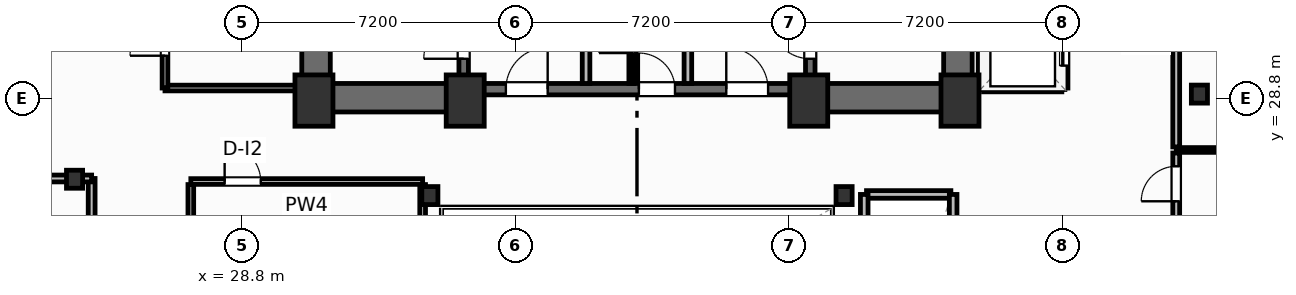
"""IFC4 building model, lengths in metres.
Left out: names, types, materials, properties, quantities, classifications, styles, units other than length and angle.
Written with IfcOpenShell. Run it as: python <this file> out.ifc"""

import sys

from ifc_helpers import new_model, si_unit, direction, frame, frame_2d, origin, origin_2d, place, context, subcontext, project, spatial, rectangle, i_section, extrude, element, fill, save


model = new_model("IFC4")
c1 = context("Model", 3, precision=1e-05, world=origin(), true_north=direction((0.0, 1.0)))
c2 = subcontext(c1, "Body", "Model", "MODEL_VIEW")
j1 = project(units=[si_unit("LENGTHUNIT", "METRE"), si_unit("PLANEANGLEUNIT", "RADIAN")], contexts=[c1])
p1 = place(None, origin())
s1 = spatial("IfcSite", under=j1, at=p1, CompositionType="ELEMENT")
p2 = place(p1, origin())
s2 = spatial("IfcBuilding", under=s1, at=p2, CompositionType="ELEMENT")
p3 = place(p2, frame((0.0, 0.0, 129.1)))
s3 = spatial("IfcBuildingStorey", under=s2, at=p3, CompositionType="ELEMENT", Elevation=129.1)
for number, where, z_axis, x_axis in (
    (1, (30.7, 28.75, 0.0), (0.0, 0.0, 1.0), (1.0, 0.0, 0.0)),
    (2, (34.68, 28.75, 0.0), (0.0, 0.0, 1.0), (1.0, 0.0, 0.0)),
    (3, (43.72, 28.75, 0.0), (0.0, 0.0, 1.0), (1.0, 0.0, 0.0)),
    (4, (47.7, 28.75, 0.0), (0.0, 0.0, 1.0), (1.0, 0.0, 0.0)),
):
    element("IfcColumn", number, at=place(p3, frame(where, z_axis=z_axis, x_axis=x_axis)), inside=s3, PredefinedType="COLUMN", context=c2, shape_type="SweptSolid", body=[
        extrude(rectangle(XDim=1.0, YDim=1.35, at=origin_2d()), origin(), (0.0, 0.0, 1.0), 3.7),
    ])
for number, where, z_axis, x_axis in (
    (5, (33.75, 26.25, 0.0), (0.0, 0.0, 1.0), (1.0, 0.0, 0.0)),
    (6, (44.65, 26.25, 0.0), (0.0, 0.0, 1.0), (1.0, 0.0, 0.0)),
    (7, (24.4, 26.68, 0.0), (0.0, 0.0, 1.0), (1.0, 0.0, 0.0)),
    (8, (54.0, 28.92, 0.0), (0.0, 0.0, 1.0), (1.0, 0.0, 0.0)),
):
    element("IfcColumn", number, at=place(p3, frame(where, z_axis=z_axis, x_axis=x_axis)), inside=s3, PredefinedType="COLUMN", context=c2, shape_type="SweptSolid", body=[
        extrude(i_section(OverallWidth=0.424, OverallDepth=0.474, WebThickness=0.048, FlangeThickness=0.077, FilletRadius=0.025, at=origin_2d()), origin(), (0.0, 0.0, 1.0), 3.7),
    ])
for number, where, z_axis, x_axis in (
    (9, (30.755, 29.2, 0.0), (0.0, 0.0, 1.0), (0.0, 1.0, 0.0)),
    (10, (47.645, 29.2, 0.0), (0.0, 0.0, 1.0), (0.0, 1.0, 0.0)),
):
    element("IfcWall", number, at=place(p3, frame(where, z_axis=z_axis, x_axis=x_axis)), inside=s3, PredefinedType="SHEAR", context=c2, shape_type="SweptSolid", body=[
        extrude(rectangle(XDim=9.22, YDim=0.75, at=frame_2d((4.61, 0.0))), origin(), (0.0, 0.0, 1.0), 3.45),
    ])
p4 = place(p3, frame((30.38, 28.825, 0.0), z_axis=(0.0, 0.0, 1.0), x_axis=(1.0, 0.0, 0.0)))
e11 = element("IfcWall", 11, at=p4, inside=s3, PredefinedType="SHEAR", context=c2, shape_type="SweptSolid", body=[
    extrude(rectangle(XDim=4.42, YDim=0.75, at=frame_2d((2.21, 0.0))), origin(), (0.0, 0.0, 1.0), 3.45),
])
p5 = place(p3, frame((43.6, 28.825, 0.0), z_axis=(0.0, 0.0, 1.0), x_axis=(1.0, 0.0, 0.0)))
e12 = element("IfcWall", 12, at=p5, inside=s3, PredefinedType="SHEAR", context=c2, shape_type="SweptSolid", body=[
    extrude(rectangle(XDim=4.42, YDim=0.75, at=frame_2d((2.21, 0.0))), origin(), (0.0, 0.0, 1.0), 3.45),
])
p6 = place(p3, frame((34.8, 29.05, 0.0), z_axis=(0.0, 0.0, 1.0), x_axis=(1.0, 0.0, 0.0)))
e13 = element("IfcWall", 13, at=p6, inside=s3, PredefinedType="SHEAR", context=c2, shape_type="SweptSolid", body=[
    extrude(rectangle(XDim=8.8, YDim=0.3, at=frame_2d((4.4, 0.0))), origin(), (0.0, 0.0, 1.0), 3.45),
])
p7 = place(p6, frame((0.95, 0.0, 0.0)))
e14 = element("IfcOpeningElement", 14, at=p7, cuts=e13, PredefinedType="OPENING", context=c2, shape_type="SweptSolid", body=[
    extrude(rectangle(XDim=1.1, YDim=2.15, at=frame_2d((0.55, 1.075))), frame((0.0, 0.16, 0.0), z_axis=(0.0, -1.0, 0.0), x_axis=(1.0, 0.0, 0.0)), (0.0, 0.0, 1.0), 0.32),
])
p8 = place(p6, frame((6.75, 0.0, 0.0)))
e15 = element("IfcOpeningElement", 15, at=p8, cuts=e13, PredefinedType="OPENING", context=c2, shape_type="SweptSolid", body=[
    extrude(rectangle(XDim=1.1, YDim=2.15, at=frame_2d((0.55, 1.075))), frame((0.0, 0.16, 0.0), z_axis=(0.0, -1.0, 0.0), x_axis=(1.0, 0.0, 0.0)), (0.0, 0.0, 1.0), 0.32),
])
p9 = place(p6, frame((4.45, 0.0, 0.0)))
e16 = element("IfcOpeningElement", 16, at=p9, cuts=e13, PredefinedType="OPENING", context=c2, shape_type="SweptSolid", body=[
    extrude(rectangle(XDim=0.95, YDim=2.15, at=frame_2d((0.475, 1.075))), frame((0.0, 0.16, 0.0), z_axis=(0.0, -1.0, 0.0), x_axis=(1.0, 0.0, 0.0)), (0.0, 0.0, 1.0), 0.32),
])
p10 = place(p3, frame((34.64, 29.2, 0.0), z_axis=(0.0, 0.0, 1.0), x_axis=(0.0, 1.0, 0.0)))
e17 = element("IfcWall", 17, at=p10, inside=s3, PredefinedType="SHEAR", context=c2, shape_type="SweptSolid", body=[
    extrude(rectangle(XDim=9.22, YDim=0.25, at=frame_2d((4.61, 0.0))), origin(), (0.0, 0.0, 1.0), 3.45),
])
p11 = place(p10, frame((0.65, 0.0, 0.0)))
e18 = element("IfcOpeningElement", 18, at=p11, cuts=e17, PredefinedType="OPENING", context=c2, shape_type="SweptSolid", body=[
    extrude(rectangle(XDim=1.05, YDim=2.15, at=frame_2d((0.525, 1.075))), frame((0.0, 0.135, 0.0), z_axis=(0.0, -1.0, 0.0), x_axis=(1.0, 0.0, 0.0)), (0.0, 0.0, 1.0), 0.27),
])
p12 = place(p3, frame((43.76, 29.2, 0.0), z_axis=(0.0, 0.0, 1.0), x_axis=(0.0, 1.0, 0.0)))
e19 = element("IfcWall", 19, at=p12, inside=s3, PredefinedType="SHEAR", context=c2, shape_type="SweptSolid", body=[
    extrude(rectangle(XDim=9.22, YDim=0.25, at=frame_2d((4.61, 0.0))), origin(), (0.0, 0.0, 1.0), 3.45),
])
p13 = place(p12, frame((0.65, 0.0, 0.0)))
e20 = element("IfcOpeningElement", 20, at=p13, cuts=e19, PredefinedType="OPENING", context=c2, shape_type="SweptSolid", body=[
    extrude(rectangle(XDim=1.05, YDim=2.15, at=frame_2d((0.525, 1.075))), frame((0.0, 0.135, 0.0), z_axis=(0.0, -1.0, 0.0), x_axis=(1.0, 0.0, 0.0)), (0.0, 0.0, 1.0), 0.27),
])
p14 = place(p3, frame((24.85, 19.2, 0.0), z_axis=(0.0, 0.0, 1.0), x_axis=(0.0, 1.0, 0.0)))
e21 = element("IfcWall", 21, at=p14, inside=s3, PredefinedType="PARTITIONING", context=c2, shape_type="SweptSolid", body=[
    extrude(rectangle(XDim=7.5, YDim=0.18, at=frame_2d((3.75, 0.0))), origin(), (0.0, 0.0, 1.0), 3.45),
])
p15 = place(p14, frame((3.275, 0.0, 0.0)))
e22 = element("IfcOpeningElement", 22, at=p15, cuts=e21, PredefinedType="OPENING", context=c2, shape_type="SweptSolid", body=[
    extrude(rectangle(XDim=0.95, YDim=2.05, at=frame_2d((0.475, 1.025))), frame((0.0, 0.1, 0.0), z_axis=(0.0, -1.0, 0.0), x_axis=(1.0, 0.0, 0.0)), (0.0, 0.0, 1.0), 0.2),
])
p16 = place(p3, frame((2.078, 26.7, 0.0), z_axis=(0.0, 0.0, 1.0), x_axis=(1.0, 0.0, 0.0)))
e23 = element("IfcWall", 23, at=p16, inside=s3, PredefinedType="PARTITIONING", context=c2, shape_type="SweptSolid", body=[
    extrude(rectangle(XDim=22.772, YDim=0.18, at=frame_2d((11.386, 0.0))), origin(), (0.0, 0.0, 1.0), 2.662),
])
p17 = place(p3, frame((53.39, 19.3, 0.0), z_axis=(0.0, 0.0, 1.0), x_axis=(0.0, 1.0, 0.0)))
e24 = element("IfcWall", 24, at=p17, inside=s3, PredefinedType="PARTITIONING", context=c2, shape_type="SweptSolid", body=[
    extrude(rectangle(XDim=8.07, YDim=0.18, at=frame_2d((4.035, 0.0))), origin(), (0.0, 0.0, 1.0), 3.45),
])
p18 = place(p17, frame((6.8, 0.0, 0.0)))
e25 = element("IfcOpeningElement", 25, at=p18, cuts=e24, PredefinedType="OPENING", context=c2, shape_type="SweptSolid", body=[
    extrude(rectangle(XDim=0.92, YDim=2.05, at=frame_2d((0.46, 1.025))), frame((0.0, 0.1, 0.0), z_axis=(0.0, -1.0, 0.0), x_axis=(1.0, 0.0, 0.0)), (0.0, 0.0, 1.0), 0.2),
])
p19 = place(p3, frame((53.39, 27.53, 0.0), z_axis=(0.0, 0.0, 1.0), x_axis=(0.0, 1.0, 0.0)))
e26 = element("IfcWall", 26, at=p19, inside=s3, PredefinedType="PARTITIONING", context=c2, shape_type="SweptSolid", body=[
    extrude(rectangle(XDim=11.67, YDim=0.18, at=frame_2d((5.835, 0.0))), origin(), (0.0, 0.0, 1.0), 3.45),
])
p20 = place(p19, frame((5.8, 0.0, 0.0)))
e27 = element("IfcOpeningElement", 27, at=p20, cuts=e26, PredefinedType="OPENING", context=c2, shape_type="SweptSolid", body=[
    extrude(rectangle(XDim=0.92, YDim=2.05, at=frame_2d((0.46, 1.025))), frame((0.0, 0.1, 0.0), z_axis=(0.0, -1.0, 0.0), x_axis=(1.0, 0.0, 0.0)), (0.0, 0.0, 1.0), 0.2),
])
p21 = place(p3, frame((53.39, 27.45, 0.0), z_axis=(0.0, 0.0, 1.0), x_axis=(1.0, 0.0, 0.0)))
e28 = element("IfcWall", 28, at=p21, inside=s3, PredefinedType="PARTITIONING", context=c2, shape_type="SweptSolid", body=[
    extrude(rectangle(XDim=23.362, YDim=0.125, at=frame_2d((11.681, 0.0))), origin(), (0.0, 0.0, 1.0), 3.45),
])
for number, where, z_axis, x_axis in (
    (29, (37.86, 29.2, 0.0), (0.0, 0.0, 1.0), (0.0, 1.0, 0.0)),
    (30, (40.54, 29.2, 0.0), (0.0, 0.0, 1.0), (0.0, 1.0, 0.0)),
):
    element("IfcWall", number, at=place(p3, frame(where, z_axis=z_axis, x_axis=x_axis)), inside=s3, PredefinedType="PARTITIONING", context=c2, shape_type="SweptSolid", body=[
        extrude(rectangle(XDim=5.18, YDim=0.2, at=frame_2d((2.59, 0.0))), origin(), (0.0, 0.0, 1.0), 3.45),
    ])
p22 = place(p3, frame((39.05, 29.2, 0.0), z_axis=(0.0, 0.0, 1.0), x_axis=(0.0, 1.0, 0.0)))
e31 = element("IfcWall", 31, at=p22, inside=s3, PredefinedType="PARTITIONING", context=c2, shape_type="SweptSolid", body=[
    extrude(rectangle(XDim=5.22, YDim=0.125, at=frame_2d((2.61, 0.0))), origin(), (0.0, 0.0, 1.0), 3.45),
])
p23 = place(p22, frame((0.8, 0.0, 0.0)))
e32 = element("IfcOpeningElement", 32, at=p23, cuts=e31, PredefinedType="OPENING", context=c2, shape_type="SweptSolid", body=[
    extrude(rectangle(XDim=0.85, YDim=2.05, at=frame_2d((0.425, 1.025))), frame((0.0, 0.073, 0.0), z_axis=(0.0, -1.0, 0.0), x_axis=(1.0, 0.0, 0.0)), (0.0, 0.0, 1.0), 0.145),
])
p24 = place(p22, frame((3.4, 0.0, 0.0)))
e33 = element("IfcOpeningElement", 33, at=p24, cuts=e31, PredefinedType="OPENING", context=c2, shape_type="SweptSolid", body=[
    extrude(rectangle(XDim=0.85, YDim=2.05, at=frame_2d((0.425, 1.025))), frame((0.0, 0.073, 0.0), z_axis=(0.0, -1.0, 0.0), x_axis=(1.0, 0.0, 0.0)), (0.0, 0.0, 1.0), 0.145),
])
p25 = place(p3, frame((27.46, 26.62, 0.0), z_axis=(0.0, 0.0, 1.0), x_axis=(1.0, 0.0, 0.0)))
e34 = element("IfcWall", 34, at=p25, inside=s3, PredefinedType="PARTITIONING", context=c2, shape_type="SweptSolid", body=[
    extrude(rectangle(XDim=6.1, YDim=0.15, at=frame_2d((3.05, 0.0))), origin(), (0.0, 0.0, 1.0), 2.662),
])
p26 = place(p25, frame((0.89, 0.0, 0.0)))
e35 = element("IfcOpeningElement", 35, at=p26, cuts=e34, PredefinedType="OPENING", context=c2, shape_type="SweptSolid", body=[
    extrude(rectangle(XDim=0.95, YDim=2.05, at=frame_2d((0.475, 1.025))), frame((0.0, 0.085, 0.0), z_axis=(0.0, -1.0, 0.0), x_axis=(1.0, 0.0, 0.0)), (0.0, 0.0, 1.0), 0.17),
])
p27 = place(p3, frame((27.46, 19.38, 0.0), z_axis=(0.0, 0.0, 1.0), x_axis=(0.0, 1.0, 0.0)))
e36 = element("IfcWall", 36, at=p27, inside=s3, PredefinedType="PARTITIONING", context=c2, shape_type="SweptSolid", body=[
    extrude(rectangle(XDim=7.16, YDim=0.15, at=frame_2d((3.58, 0.0))), origin(), (0.0, 0.0, 1.0), 3.45),
])
p28 = place(p27, frame((1.1, 0.0, 0.0)))
e37 = element("IfcOpeningElement", 37, at=p28, cuts=e36, PredefinedType="OPENING", context=c2, shape_type="SweptSolid", body=[
    extrude(rectangle(XDim=0.9, YDim=2.05, at=frame_2d((0.45, 1.025))), frame((0.0, 0.085, 0.0), z_axis=(0.0, -1.0, 0.0), x_axis=(1.0, 0.0, 0.0)), (0.0, 0.0, 1.0), 0.17),
])
p29 = place(p3, frame((33.56, 19.38, 0.0), z_axis=(0.0, 0.0, 1.0), x_axis=(0.0, 1.0, 0.0)))
e38 = element("IfcWall", 38, at=p29, inside=s3, PredefinedType="PARTITIONING", context=c2, shape_type="SweptSolid", body=[
    extrude(rectangle(XDim=7.16, YDim=0.15, at=frame_2d((3.58, 0.0))), origin(), (0.0, 0.0, 1.0), 2.824),
])
p30 = place(p3, frame((26.78, 29.08, 0.0), z_axis=(0.0, 0.0, 1.0), x_axis=(1.0, 0.0, 0.0)))
e39 = element("IfcWall", 39, at=p30, inside=s3, PredefinedType="PARTITIONING", context=c2, shape_type="SweptSolid", body=[
    extrude(rectangle(XDim=3.6, YDim=0.15, at=frame_2d((1.8, 0.0))), origin(), (0.0, 0.0, 1.0), 3.45),
])
p31 = place(p3, frame((26.78, 29.08, 0.0), z_axis=(0.0, 0.0, 1.0), x_axis=(0.0, 1.0, 0.0)))
e40 = element("IfcWall", 40, at=p31, inside=s3, PredefinedType="PARTITIONING", context=c2, shape_type="SweptSolid", body=[
    extrude(rectangle(XDim=5.87, YDim=0.15, at=frame_2d((2.935, 0.0))), origin(), (0.0, 0.0, 1.0), 3.45),
])
p32 = place(p31, frame((0.85, 0.0, 0.0)))
e41 = element("IfcOpeningElement", 41, at=p32, cuts=e40, PredefinedType="OPENING", context=c2, shape_type="SweptSolid", body=[
    extrude(rectangle(XDim=0.92, YDim=2.05, at=frame_2d((0.46, 1.025))), frame((0.0, 0.085, 0.0), z_axis=(0.0, -1.0, 0.0), x_axis=(1.0, 0.0, 0.0)), (0.0, 0.0, 1.0), 0.17),
])
p33 = place(p31, frame((3.45, 0.0, 0.0)))
e42 = element("IfcOpeningElement", 42, at=p33, cuts=e40, PredefinedType="OPENING", context=c2, shape_type="SweptSolid", body=[
    extrude(rectangle(XDim=0.85, YDim=2.05, at=frame_2d((0.425, 1.025))), frame((0.0, 0.085, 0.0), z_axis=(0.0, -1.0, 0.0), x_axis=(1.0, 0.0, 0.0)), (0.0, 0.0, 1.0), 0.17),
])
p34 = place(p3, frame((48.32, 29.08, 0.0), z_axis=(0.0, 0.0, 1.0), x_axis=(1.0, 0.0, 0.0)))
e43 = element("IfcWall", 43, at=p34, inside=s3, PredefinedType="PARTITIONING", context=c2, shape_type="SweptSolid", body=[
    extrude(rectangle(XDim=2.06, YDim=0.2, at=frame_2d((1.03, 0.0))), origin(), (0.0, 0.0, 1.0), 2.662),
])
p35 = place(p3, frame((48.28, 29.08, 0.0), z_axis=(0.0, 0.0, 1.0), x_axis=(0.0, 1.0, 0.0)))
e44 = element("IfcWall", 44, at=p35, inside=s3, PredefinedType="PARTITIONING", context=c2, shape_type="SweptSolid", body=[
    extrude(rectangle(XDim=6.89, YDim=0.2, at=frame_2d((3.445, 0.0))), origin(), (0.0, 0.0, 1.0), 3.45),
])
p36 = place(p3, frame((50.44, 29.08, 0.0), z_axis=(0.0, 0.0, 1.0), x_axis=(0.0, 1.0, 0.0)))
e45 = element("IfcWall", 45, at=p36, inside=s3, PredefinedType="PARTITIONING", context=c2, shape_type="SweptSolid", body=[
    extrude(rectangle(XDim=6.89, YDim=0.2, at=frame_2d((3.445, 0.0))), origin(), (0.0, 0.0, 1.0), 3.45),
])
p37 = place(p36, frame((0.59, 0.0, 0.0)))
e46 = element("IfcOpeningElement", 46, at=p37, cuts=e45, PredefinedType="OPENING", context=c2, shape_type="SweptSolid", body=[
    extrude(rectangle(XDim=1.1, YDim=2.15, at=frame_2d((0.55, 1.075))), frame((0.0, 0.11, 0.0), z_axis=(0.0, -1.0, 0.0), x_axis=(1.0, 0.0, 0.0)), (0.0, 0.0, 1.0), 0.22),
])
p38 = place(p36, frame((2.89, 0.0, 0.0)))
e47 = element("IfcOpeningElement", 47, at=p38, cuts=e45, PredefinedType="OPENING", context=c2, shape_type="SweptSolid", body=[
    extrude(rectangle(XDim=1.1, YDim=2.15, at=frame_2d((0.55, 1.075))), frame((0.0, 0.11, 0.0), z_axis=(0.0, -1.0, 0.0), x_axis=(1.0, 0.0, 0.0)), (0.0, 0.0, 1.0), 0.22),
])
p39 = place(p36, frame((5.19, 0.0, 0.0)))
e48 = element("IfcOpeningElement", 48, at=p39, cuts=e45, PredefinedType="OPENING", context=c2, shape_type="SweptSolid", body=[
    extrude(rectangle(XDim=1.1, YDim=2.15, at=frame_2d((0.55, 1.075))), frame((0.0, 0.11, 0.0), z_axis=(0.0, -1.0, 0.0), x_axis=(1.0, 0.0, 0.0)), (0.0, 0.0, 1.0), 0.22),
])
p40 = place(p3, frame((45.24, 26.28, 0.0), z_axis=(0.0, 0.0, 1.0), x_axis=(1.0, 0.0, 0.0)))
e49 = element("IfcWall", 49, at=p40, inside=s3, PredefinedType="PARTITIONING", context=c2, shape_type="SweptSolid", body=[
    extrude(rectangle(XDim=2.22, YDim=0.2, at=frame_2d((1.11, 0.0))), origin(), (0.0, 0.0, 1.0), 3.45),
])
for number, where, z_axis, x_axis in (
    (50, (45.18, 19.38, 0.0), (0.0, 0.0, 1.0), (0.0, 1.0, 0.0)),
    (51, (47.52, 19.38, 0.0), (0.0, 0.0, 1.0), (0.0, 1.0, 0.0)),
):
    element("IfcWall", number, at=place(p3, frame(where, z_axis=z_axis, x_axis=x_axis)), inside=s3, PredefinedType="PARTITIONING", context=c2, shape_type="SweptSolid", body=[
        extrude(rectangle(XDim=6.9, YDim=0.2, at=frame_2d((3.45, 0.0))), origin(), (0.0, 0.0, 1.0), 3.45),
    ])
p41 = place(p18, origin())
e52 = element("IfcDoor", 52, at=p41, inside=s3, OperationType="SINGLE_SWING_LEFT", PredefinedType="DOOR", context=c2, shape_type="SweptSolid", body=[
    extrude(rectangle(XDim=0.92, YDim=2.05, at=frame_2d((0.46, 1.025))), frame((0.0, 0.025, 0.0), z_axis=(0.0, -1.0, 0.0), x_axis=(1.0, 0.0, 0.0)), (0.0, 0.0, 1.0), 0.05),
])
fill(e25, e52)
p42 = place(p11, origin())
e53 = element("IfcDoor", 53, at=p42, inside=s3, OperationType="SINGLE_SWING_LEFT", PredefinedType="DOOR", context=c2, shape_type="SweptSolid", body=[
    extrude(rectangle(XDim=1.05, YDim=2.15, at=frame_2d((0.525, 1.075))), frame((0.0, 0.025, 0.0), z_axis=(0.0, -1.0, 0.0), x_axis=(1.0, 0.0, 0.0)), (0.0, 0.0, 1.0), 0.05),
])
fill(e18, e53)
p43 = place(p13, origin())
e54 = element("IfcDoor", 54, at=p43, inside=s3, OperationType="SINGLE_SWING_RIGHT", PredefinedType="DOOR", context=c2, shape_type="SweptSolid", body=[
    extrude(rectangle(XDim=1.05, YDim=2.15, at=frame_2d((0.525, 1.075))), frame((0.0, 0.025, 0.0), z_axis=(0.0, -1.0, 0.0), x_axis=(1.0, 0.0, 0.0)), (0.0, 0.0, 1.0), 0.05),
])
fill(e20, e54)
p44 = place(p7, origin())
e55 = element("IfcDoor", 55, at=p44, inside=s3, OperationType="SINGLE_SWING_RIGHT", PredefinedType="DOOR", context=c2, shape_type="SweptSolid", body=[
    extrude(rectangle(XDim=1.1, YDim=2.15, at=frame_2d((0.55, 1.075))), frame((0.0, 0.025, 0.0), z_axis=(0.0, -1.0, 0.0), x_axis=(1.0, 0.0, 0.0)), (0.0, 0.0, 1.0), 0.05),
])
fill(e14, e55)
p45 = place(p8, origin())
e56 = element("IfcDoor", 56, at=p45, inside=s3, OperationType="SINGLE_SWING_LEFT", PredefinedType="DOOR", context=c2, shape_type="SweptSolid", body=[
    extrude(rectangle(XDim=1.1, YDim=2.15, at=frame_2d((0.55, 1.075))), frame((0.0, 0.025, 0.0), z_axis=(0.0, -1.0, 0.0), x_axis=(1.0, 0.0, 0.0)), (0.0, 0.0, 1.0), 0.05),
])
fill(e15, e56)
p46 = place(p23, origin())
e57 = element("IfcDoor", 57, at=p46, inside=s3, OperationType="SINGLE_SWING_LEFT", PredefinedType="DOOR", context=c2, shape_type="SweptSolid", body=[
    extrude(rectangle(XDim=0.85, YDim=2.05, at=frame_2d((0.425, 1.025))), frame((0.0, 0.025, 0.0), z_axis=(0.0, -1.0, 0.0), x_axis=(1.0, 0.0, 0.0)), (0.0, 0.0, 1.0), 0.05),
])
fill(e32, e57)
p47 = place(p9, origin())
e58 = element("IfcDoor", 58, at=p47, inside=s3, OperationType="SINGLE_SWING_LEFT", PredefinedType="DOOR", context=c2, shape_type="SweptSolid", body=[
    extrude(rectangle(XDim=0.95, YDim=2.15, at=frame_2d((0.475, 1.075))), frame((0.0, 0.025, 0.0), z_axis=(0.0, -1.0, 0.0), x_axis=(1.0, 0.0, 0.0)), (0.0, 0.0, 1.0), 0.05),
])
fill(e16, e58)
p48 = place(p26, origin())
e59 = element("IfcDoor", 59, at=p48, inside=s3, OperationType="SINGLE_SWING_LEFT", PredefinedType="DOOR", context=c2, shape_type="SweptSolid", body=[
    extrude(rectangle(XDim=0.95, YDim=2.05, at=frame_2d((0.475, 1.025))), frame((0.0, 0.025, 0.0), z_axis=(0.0, -1.0, 0.0), x_axis=(1.0, 0.0, 0.0)), (0.0, 0.0, 1.0), 0.05),
])
fill(e35, e59)
p49 = place(p32, origin())
e60 = element("IfcDoor", 60, at=p49, inside=s3, OperationType="SINGLE_SWING_LEFT", PredefinedType="DOOR", context=c2, shape_type="SweptSolid", body=[
    extrude(rectangle(XDim=0.92, YDim=2.05, at=frame_2d((0.46, 1.025))), frame((0.0, 0.025, 0.0), z_axis=(0.0, -1.0, 0.0), x_axis=(1.0, 0.0, 0.0)), (0.0, 0.0, 1.0), 0.05),
])
fill(e41, e60)
p50 = place(p37, origin())
e61 = element("IfcDoor", 61, at=p50, inside=s3, OperationType="SLIDING_TO_LEFT", PredefinedType="DOOR", context=c2, shape_type="SweptSolid", body=[
    extrude(rectangle(XDim=1.1, YDim=2.15, at=frame_2d((0.55, 1.075))), frame((0.0, 0.025, 0.0), z_axis=(0.0, -1.0, 0.0), x_axis=(1.0, 0.0, 0.0)), (0.0, 0.0, 1.0), 0.05),
])
fill(e46, e61)
save(model, sys.argv[1])
